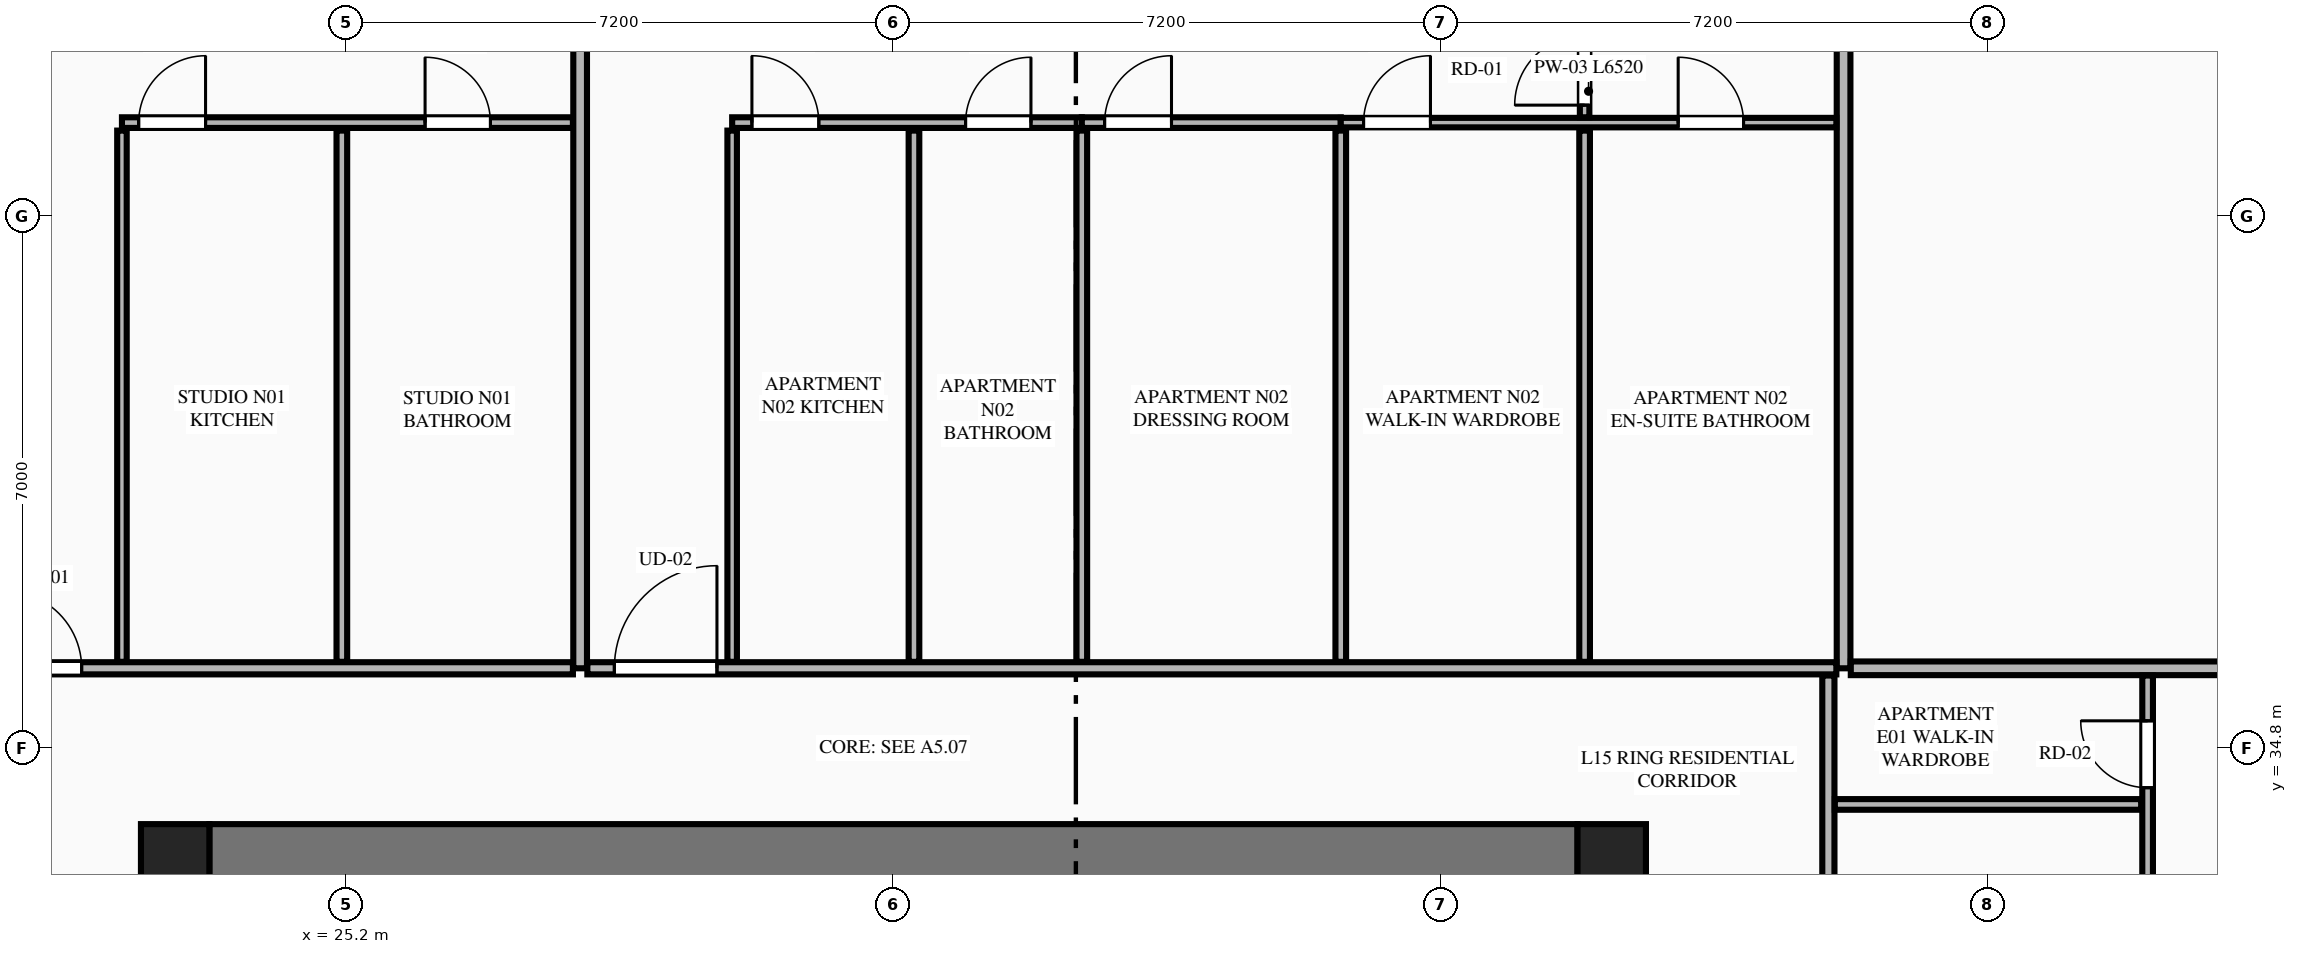
"""IFC4 building model, lengths in metres.
Left out: names, types, materials, properties, quantities, classifications, styles, units other than length and angle.
Written with IfcOpenShell. Run it as: python <this file> out.ifc"""

import sys

from ifc_helpers import new_model, si_unit, direction, frame, frame_2d, origin, origin_2d, place, context, subcontext, project, spatial, rectangle, extrude, element, fill, save


model = new_model("IFC4")
c1 = context("Model", 3, precision=1e-05, world=origin(), true_north=direction((0.0, 1.0)))
c2 = subcontext(c1, "Body", "Model", "MODEL_VIEW")
j1 = project(units=[si_unit("LENGTHUNIT", "METRE"), si_unit("PLANEANGLEUNIT", "RADIAN")], contexts=[c1])
p1 = place(None, origin())
s1 = spatial("IfcSite", under=j1, at=p1, CompositionType="ELEMENT")
p2 = place(p1, origin())
s2 = spatial("IfcBuilding", under=s1, at=p2, CompositionType="ELEMENT")
p3 = place(p2, frame((0.0, 0.0, 60.4)))
s3 = spatial("IfcBuildingStorey", under=s2, at=p3, CompositionType="ELEMENT", Elevation=60.4)
for number, where, z_axis, x_axis in (
    (1, (41.85, 33.35, 0.0), (0.0, 0.0, 1.0), (1.0, 0.0, 0.0)),
    (2, (22.95, 33.35, 0.0), (0.0, 0.0, 1.0), (1.0, 0.0, 0.0)),
):
    element("IfcColumn", number, at=place(p3, frame(where, z_axis=z_axis, x_axis=x_axis)), inside=s3, PredefinedType="COLUMN", context=c2, shape_type="SweptSolid", body=[
        extrude(rectangle(XDim=0.9, YDim=0.9, at=origin_2d()), origin(), (0.0, 0.0, 1.0), 3.55),
    ])
p4 = place(p3, frame((23.4, 33.35, 0.0), z_axis=(0.0, 0.0, 1.0), x_axis=(1.0, 0.0, 0.0)))
e3 = element("IfcWall", 3, at=p4, inside=s3, PredefinedType="SHEAR", context=c2, shape_type="SweptSolid", body=[
    extrude(rectangle(XDim=18.0, YDim=0.9, at=frame_2d((9.0, 0.0))), origin(), (0.0, 0.0, 1.0), 3.33),
])
p5 = place(p3, frame((51.583, 41.372, 0.0), z_axis=(0.0, 0.0, 1.0), x_axis=(-0.451697561555, 0.892171123095, 0.0)))
e4 = element("IfcWall", 4, at=p5, inside=s3, PredefinedType="STANDARD", context=c2, shape_type="SweptSolid", body=[
    extrude(rectangle(XDim=5.351, YDim=0.34, at=frame_2d((2.675, 0.0))), origin(), (0.0, 0.0, 1.0), 2.787),
])
p6 = place(p5, frame((2.125, 0.0, 0.75)))
e5 = element("IfcOpeningElement", 5, at=p6, cuts=e4, PredefinedType="OPENING", context=c2, shape_type="SweptSolid", body=[
    extrude(rectangle(XDim=1.1, YDim=1.887, at=frame_2d((0.55, 0.943))), frame((0.0, 0.18, 0.0), z_axis=(0.0, -1.0, 0.0), x_axis=(1.0, 0.0, 0.0)), (0.0, 0.0, 1.0), 0.36),
])
p7 = place(p3, frame((28.278, 35.85, 0.0), z_axis=(0.0, 0.0, 1.0), x_axis=(0.0, 1.0, 0.0)))
e6 = element("IfcWall", 6, at=p7, inside=s3, PredefinedType="PARTITIONING", context=c2, shape_type="SweptSolid", body=[
    extrude(rectangle(XDim=13.295, YDim=0.18, at=frame_2d((6.647, 0.0))), origin(), (0.0, 0.0, 1.0), 2.636),
])
p8 = place(p3, frame((44.9, 35.85, 0.0), z_axis=(0.0, 0.0, 1.0), x_axis=(0.0, 1.0, 0.0)))
e7 = element("IfcWall", 7, at=p8, inside=s3, PredefinedType="PARTITIONING", context=c2, shape_type="SweptSolid", body=[
    extrude(rectangle(XDim=13.295, YDim=0.18, at=frame_2d((6.647, 0.0))), origin(), (0.0, 0.0, 1.0), 3.33),
])
p9 = place(p3, frame((19.995, 35.85, 0.0), z_axis=(0.0, 0.0, 1.0), x_axis=(1.0, 0.0, 0.0)))
e8 = element("IfcWall", 8, at=p9, inside=s3, PredefinedType="PARTITIONING", context=c2, shape_type="SweptSolid", body=[
    extrude(rectangle(XDim=8.188, YDim=0.16, at=frame_2d((4.094, 0.0))), origin(), (0.0, 0.0, 1.0), 3.33),
])
p10 = place(p9, frame((0.705, 0.0, 0.0)))
e9 = element("IfcOpeningElement", 9, at=p10, cuts=e8, PredefinedType="OPENING", context=c2, shape_type="SweptSolid", body=[
    extrude(rectangle(XDim=1.02, YDim=2.25, at=frame_2d((0.51, 1.125))), frame((0.0, 0.09, 0.0), z_axis=(0.0, -1.0, 0.0), x_axis=(1.0, 0.0, 0.0)), (0.0, 0.0, 1.0), 0.18),
])
p11 = place(p3, frame((22.25, 35.935, 0.0), z_axis=(0.0, 0.0, 1.0), x_axis=(0.0, 1.0, 0.0)))
e10 = element("IfcWall", 10, at=p11, inside=s3, PredefinedType="PARTITIONING", context=c2, shape_type="SweptSolid", body=[
    extrude(rectangle(XDim=6.989, YDim=0.125, at=frame_2d((3.495, 0.0))), origin(), (0.0, 0.0, 1.0), 2.636),
])
p12 = place(p3, frame((22.25, 43.029, 0.0), z_axis=(0.0, 0.0, 1.0), x_axis=(1.0, 0.0, 0.0)))
e11 = element("IfcWall", 11, at=p12, inside=s3, PredefinedType="PLUMBINGWALL", context=c2, shape_type="SweptSolid", body=[
    extrude(rectangle(XDim=5.933, YDim=0.14, at=frame_2d((2.967, 0.0))), origin(), (0.0, 0.0, 1.0), 3.33),
])
p13 = place(p12, frame((3.988, 0.0, 0.0)))
e12 = element("IfcOpeningElement", 12, at=p13, cuts=e11, PredefinedType="OPENING", context=c2, shape_type="SweptSolid", body=[
    extrude(rectangle(XDim=0.86, YDim=2.1, at=frame_2d((0.43, 1.05))), frame((0.0, 0.08, 0.0), z_axis=(0.0, -1.0, 0.0), x_axis=(1.0, 0.0, 0.0)), (0.0, 0.0, 1.0), 0.16),
])
p14 = place(p12, frame((0.22, 0.0, 0.0)))
e13 = element("IfcOpeningElement", 13, at=p14, cuts=e11, PredefinedType="OPENING", context=c2, shape_type="SweptSolid", body=[
    extrude(rectangle(XDim=0.88, YDim=2.15, at=frame_2d((0.44, 1.075))), frame((0.0, 0.08, 0.0), z_axis=(0.0, -1.0, 0.0), x_axis=(1.0, 0.0, 0.0)), (0.0, 0.0, 1.0), 0.16),
])
p15 = place(p3, frame((25.143, 35.935, 0.0), z_axis=(0.0, 0.0, 1.0), x_axis=(0.0, 1.0, 0.0)))
e14 = element("IfcWall", 14, at=p15, inside=s3, PredefinedType="PLUMBINGWALL", context=c2, shape_type="SweptSolid", body=[
    extrude(rectangle(XDim=6.989, YDim=0.14, at=frame_2d((3.495, 0.0))), origin(), (0.0, 0.0, 1.0), 3.33),
])
p16 = place(p3, frame((28.373, 35.85, 0.0), z_axis=(0.0, 0.0, 1.0), x_axis=(1.0, 0.0, 0.0)))
e15 = element("IfcWall", 15, at=p16, inside=s3, PredefinedType="PARTITIONING", context=c2, shape_type="SweptSolid", body=[
    extrude(rectangle(XDim=16.432, YDim=0.16, at=frame_2d((8.216, 0.0))), origin(), (0.0, 0.0, 1.0), 3.33),
])
p17 = place(p16, frame((0.355, 0.0, 0.0)))
e16 = element("IfcOpeningElement", 16, at=p17, cuts=e15, PredefinedType="OPENING", context=c2, shape_type="SweptSolid", body=[
    extrude(rectangle(XDim=1.35, YDim=2.35, at=frame_2d((0.675, 1.175))), frame((0.0, 0.09, 0.0), z_axis=(0.0, -1.0, 0.0), x_axis=(1.0, 0.0, 0.0)), (0.0, 0.0, 1.0), 0.18),
])
p18 = place(p3, frame((30.278, 35.935, 0.0), z_axis=(0.0, 0.0, 1.0), x_axis=(0.0, 1.0, 0.0)))
e17 = element("IfcWall", 17, at=p18, inside=s3, PredefinedType="PARTITIONING", context=c2, shape_type="SweptSolid", body=[
    extrude(rectangle(XDim=6.989, YDim=0.125, at=frame_2d((3.495, 0.0))), origin(), (0.0, 0.0, 1.0), 3.33),
])
p19 = place(p3, frame((30.278, 43.029, 0.0), z_axis=(0.0, 0.0, 1.0), x_axis=(1.0, 0.0, 0.0)))
e18 = element("IfcWall", 18, at=p19, inside=s3, PredefinedType="PLUMBINGWALL", context=c2, shape_type="SweptSolid", body=[
    extrude(rectangle(XDim=4.6, YDim=0.14, at=frame_2d((2.3, 0.0))), origin(), (0.0, 0.0, 1.0), 3.33),
])
p20 = place(p19, frame((3.071, 0.0, 0.0)))
e19 = element("IfcOpeningElement", 19, at=p20, cuts=e18, PredefinedType="OPENING", context=c2, shape_type="SweptSolid", body=[
    extrude(rectangle(XDim=0.86, YDim=2.1, at=frame_2d((0.43, 1.05))), frame((0.0, 0.08, 0.0), z_axis=(0.0, -1.0, 0.0), x_axis=(1.0, 0.0, 0.0)), (0.0, 0.0, 1.0), 0.16),
])
p21 = place(p19, frame((0.26, 0.0, 0.0)))
e20 = element("IfcOpeningElement", 20, at=p21, cuts=e18, PredefinedType="OPENING", context=c2, shape_type="SweptSolid", body=[
    extrude(rectangle(XDim=0.88, YDim=2.15, at=frame_2d((0.44, 1.075))), frame((0.0, 0.08, 0.0), z_axis=(0.0, -1.0, 0.0), x_axis=(1.0, 0.0, 0.0)), (0.0, 0.0, 1.0), 0.16),
])
p22 = place(p3, frame((34.878, 43.029, 0.0), z_axis=(0.0, 0.0, 1.0), x_axis=(1.0, 0.0, 0.0)))
e21 = element("IfcWall", 21, at=p22, inside=s3, PredefinedType="PLUMBINGWALL", context=c2, shape_type="SweptSolid", body=[
    extrude(rectangle(XDim=3.407, YDim=0.14, at=frame_2d((1.704, 0.0))), origin(), (0.0, 0.0, 1.0), 3.33),
])
p23 = place(p22, frame((0.3, 0.0, 0.0)))
e22 = element("IfcOpeningElement", 22, at=p23, cuts=e21, PredefinedType="OPENING", context=c2, shape_type="SweptSolid", body=[
    extrude(rectangle(XDim=0.88, YDim=2.15, at=frame_2d((0.44, 1.075))), frame((0.0, 0.08, 0.0), z_axis=(0.0, -1.0, 0.0), x_axis=(1.0, 0.0, 0.0)), (0.0, 0.0, 1.0), 0.16),
])
p24 = place(p3, frame((38.285, 43.029, 0.0), z_axis=(0.0, 0.0, 1.0), x_axis=(1.0, 0.0, 0.0)))
e23 = element("IfcWall", 23, at=p24, inside=s3, PredefinedType="PARTITIONING", context=c2, shape_type="SweptSolid", body=[
    extrude(rectangle(XDim=6.52, YDim=0.125, at=frame_2d((3.26, 0.0))), origin(), (0.0, 0.0, 1.0), 3.33),
])
p25 = place(p24, frame((4.439, 0.0, 0.0)))
e24 = element("IfcOpeningElement", 24, at=p25, cuts=e23, PredefinedType="OPENING", context=c2, shape_type="SweptSolid", body=[
    extrude(rectangle(XDim=0.86, YDim=2.1, at=frame_2d((0.43, 1.05))), frame((0.0, 0.073, 0.0), z_axis=(0.0, -1.0, 0.0), x_axis=(1.0, 0.0, 0.0)), (0.0, 0.0, 1.0), 0.145),
])
p26 = place(p24, frame((0.3, 0.0, 0.0)))
e25 = element("IfcOpeningElement", 25, at=p26, cuts=e23, PredefinedType="OPENING", context=c2, shape_type="SweptSolid", body=[
    extrude(rectangle(XDim=0.88, YDim=2.15, at=frame_2d((0.44, 1.075))), frame((0.0, 0.073, 0.0), z_axis=(0.0, -1.0, 0.0), x_axis=(1.0, 0.0, 0.0)), (0.0, 0.0, 1.0), 0.145),
])
p27 = place(p3, frame((32.67, 35.935, 0.0), z_axis=(0.0, 0.0, 1.0), x_axis=(0.0, 1.0, 0.0)))
e26 = element("IfcWall", 26, at=p27, inside=s3, PredefinedType="PLUMBINGWALL", context=c2, shape_type="SweptSolid", body=[
    extrude(rectangle(XDim=6.989, YDim=0.14, at=frame_2d((3.495, 0.0))), origin(), (0.0, 0.0, 1.0), 3.33),
])
p28 = place(p3, frame((41.493, 43.099, 0.0), z_axis=(0.0, 0.0, 1.0), x_axis=(0.0, 1.0, 0.0)))
e27 = element("IfcWall", 27, at=p28, inside=s3, PredefinedType="PARTITIONING", context=c2, shape_type="SweptSolid", body=[
    extrude(rectangle(XDim=1.33, YDim=0.125, at=frame_2d((0.665, 0.0))), origin(), (0.0, 0.0, 1.0), 3.33),
])
p29 = place(p28, frame((0.16, 0.0, 0.0)))
e28 = element("IfcOpeningElement", 28, at=p29, cuts=e27, PredefinedType="OPENING", context=c2, shape_type="SweptSolid", body=[
    extrude(rectangle(XDim=0.92, YDim=2.15, at=frame_2d((0.46, 1.075))), frame((0.0, 0.073, 0.0), z_axis=(0.0, -1.0, 0.0), x_axis=(1.0, 0.0, 0.0)), (0.0, 0.0, 1.0), 0.145),
])
for number, where, z_axis, x_axis in (
    (29, (34.878, 35.935, 0.0), (0.0, 0.0, 1.0), (0.0, 1.0, 0.0)),
    (30, (38.285, 35.935, 0.0), (0.0, 0.0, 1.0), (0.0, 1.0, 0.0)),
    (31, (41.493, 35.935, 0.0), (0.0, 0.0, 1.0), (0.0, 1.0, 0.0)),
):
    element("IfcWall", number, at=place(p3, frame(where, z_axis=z_axis, x_axis=x_axis)), inside=s3, PredefinedType="PLUMBINGWALL", context=c2, shape_type="SweptSolid", body=[
        extrude(rectangle(XDim=6.989, YDim=0.14, at=frame_2d((3.495, 0.0))), origin(), (0.0, 0.0, 1.0), 3.33),
    ])
p30 = place(p3, frame((44.995, 35.85, 0.0), z_axis=(0.0, 0.0, 1.0), x_axis=(1.0, 0.0, 0.0)))
e32 = element("IfcWall", 32, at=p30, inside=s3, PredefinedType="PARTITIONING", context=c2, shape_type="SweptSolid", body=[
    extrude(rectangle(XDim=9.14, YDim=0.18, at=frame_2d((4.57, 0.0))), origin(), (0.0, 0.0, 1.0), 3.33),
])
p31 = place(p3, frame((44.7, 16.045, 0.0), z_axis=(0.0, 0.0, 1.0), x_axis=(0.0, 1.0, 0.0)))
e33 = element("IfcWall", 33, at=p31, inside=s3, PredefinedType="PARTITIONING", context=c2, shape_type="SweptSolid", body=[
    extrude(rectangle(XDim=19.71, YDim=0.16, at=frame_2d((9.855, 0.0))), origin(), (0.0, 0.0, 1.0), 3.33),
])
p32 = place(p31, frame((0.45, 0.0, 0.0)))
e34 = element("IfcOpeningElement", 34, at=p32, cuts=e33, PredefinedType="OPENING", context=c2, shape_type="SweptSolid", body=[
    extrude(rectangle(XDim=1.02, YDim=2.25, at=frame_2d((0.51, 1.125))), frame((0.0, 0.09, 0.0), z_axis=(0.0, -1.0, 0.0), x_axis=(1.0, 0.0, 0.0)), (0.0, 0.0, 1.0), 0.18),
])
p33 = place(p3, frame((48.9, 30.626, 0.0), z_axis=(0.0, 0.0, 1.0), x_axis=(0.0, 1.0, 0.0)))
e35 = element("IfcWall", 35, at=p33, inside=s3, PredefinedType="PLUMBINGWALL", context=c2, shape_type="SweptSolid", body=[
    extrude(rectangle(XDim=5.129, YDim=0.14, at=frame_2d((2.564, 0.0))), origin(), (0.0, 0.0, 1.0), 3.33),
])
p34 = place(p33, frame((0.22, 0.0, 0.0)))
e36 = element("IfcOpeningElement", 36, at=p34, cuts=e35, PredefinedType="OPENING", context=c2, shape_type="SweptSolid", body=[
    extrude(rectangle(XDim=0.86, YDim=2.1, at=frame_2d((0.43, 1.05))), frame((0.0, 0.08, 0.0), z_axis=(0.0, -1.0, 0.0), x_axis=(1.0, 0.0, 0.0)), (0.0, 0.0, 1.0), 0.16),
])
p35 = place(p33, frame((3.653, 0.0, 0.0)))
e37 = element("IfcOpeningElement", 37, at=p35, cuts=e35, PredefinedType="OPENING", context=c2, shape_type="SweptSolid", body=[
    extrude(rectangle(XDim=0.88, YDim=2.15, at=frame_2d((0.44, 1.075))), frame((0.0, 0.08, 0.0), z_axis=(0.0, -1.0, 0.0), x_axis=(1.0, 0.0, 0.0)), (0.0, 0.0, 1.0), 0.16),
])
p36 = place(p3, frame((44.785, 34.059, 0.0), z_axis=(0.0, 0.0, 1.0), x_axis=(1.0, 0.0, 0.0)))
e38 = element("IfcWall", 38, at=p36, inside=s3, PredefinedType="PLUMBINGWALL", context=c2, shape_type="SweptSolid", body=[
    extrude(rectangle(XDim=4.03, YDim=0.14, at=frame_2d((2.015, 0.0))), origin(), (0.0, 0.0, 1.0), 2.636),
])
p37 = place(p13, origin())
e39 = element("IfcDoor", 39, at=p37, inside=s3, OperationType="SINGLE_SWING_LEFT", PredefinedType="DOOR", context=c2, shape_type="SweptSolid", body=[
    extrude(rectangle(XDim=0.86, YDim=2.1, at=frame_2d((0.43, 1.05))), frame((0.0, 0.025, 0.0), z_axis=(0.0, -1.0, 0.0), x_axis=(1.0, 0.0, 0.0)), (0.0, 0.0, 1.0), 0.05),
])
fill(e12, e39)
p38 = place(p10, origin())
e40 = element("IfcDoor", 40, at=p38, inside=s3, OperationType="SINGLE_SWING_LEFT", PredefinedType="DOOR", context=c2, shape_type="SweptSolid", body=[
    extrude(rectangle(XDim=1.02, YDim=2.25, at=frame_2d((0.51, 1.125))), frame((0.0, 0.025, 0.0), z_axis=(0.0, -1.0, 0.0), x_axis=(1.0, 0.0, 0.0)), (0.0, 0.0, 1.0), 0.05),
])
fill(e9, e40)
p39 = place(p14, origin())
e41 = element("IfcDoor", 41, at=p39, inside=s3, OperationType="SINGLE_SWING_RIGHT", PredefinedType="DOOR", context=c2, shape_type="SweptSolid", body=[
    extrude(rectangle(XDim=0.88, YDim=2.15, at=frame_2d((0.44, 1.075))), frame((0.0, 0.025, 0.0), z_axis=(0.0, -1.0, 0.0), x_axis=(1.0, 0.0, 0.0)), (0.0, 0.0, 1.0), 0.05),
])
fill(e13, e41)
p40 = place(p20, origin())
e42 = element("IfcDoor", 42, at=p40, inside=s3, OperationType="SINGLE_SWING_RIGHT", PredefinedType="DOOR", context=c2, shape_type="SweptSolid", body=[
    extrude(rectangle(XDim=0.86, YDim=2.1, at=frame_2d((0.43, 1.05))), frame((0.0, 0.025, 0.0), z_axis=(0.0, -1.0, 0.0), x_axis=(1.0, 0.0, 0.0)), (0.0, 0.0, 1.0), 0.05),
])
fill(e19, e42)
p41 = place(p25, origin())
e43 = element("IfcDoor", 43, at=p41, inside=s3, OperationType="SINGLE_SWING_LEFT", PredefinedType="DOOR", context=c2, shape_type="SweptSolid", body=[
    extrude(rectangle(XDim=0.86, YDim=2.1, at=frame_2d((0.43, 1.05))), frame((0.0, 0.025, 0.0), z_axis=(0.0, -1.0, 0.0), x_axis=(1.0, 0.0, 0.0)), (0.0, 0.0, 1.0), 0.05),
])
fill(e24, e43)
p42 = place(p17, origin())
e44 = element("IfcDoor", 44, at=p42, inside=s3, OperationType="SINGLE_SWING_RIGHT", PredefinedType="DOOR", context=c2, shape_type="SweptSolid", body=[
    extrude(rectangle(XDim=1.35, YDim=2.35, at=frame_2d((0.675, 1.175))), frame((0.0, 0.025, 0.0), z_axis=(0.0, -1.0, 0.0), x_axis=(1.0, 0.0, 0.0)), (0.0, 0.0, 1.0), 0.05),
])
fill(e16, e44)
p43 = place(p21, origin())
e45 = element("IfcDoor", 45, at=p43, inside=s3, OperationType="SINGLE_SWING_LEFT", PredefinedType="DOOR", context=c2, shape_type="SweptSolid", body=[
    extrude(rectangle(XDim=0.88, YDim=2.15, at=frame_2d((0.44, 1.075))), frame((0.0, 0.025, 0.0), z_axis=(0.0, -1.0, 0.0), x_axis=(1.0, 0.0, 0.0)), (0.0, 0.0, 1.0), 0.05),
])
fill(e20, e45)
p44 = place(p23, origin())
e46 = element("IfcDoor", 46, at=p44, inside=s3, OperationType="SINGLE_SWING_RIGHT", PredefinedType="DOOR", context=c2, shape_type="SweptSolid", body=[
    extrude(rectangle(XDim=0.88, YDim=2.15, at=frame_2d((0.44, 1.075))), frame((0.0, 0.025, 0.0), z_axis=(0.0, -1.0, 0.0), x_axis=(1.0, 0.0, 0.0)), (0.0, 0.0, 1.0), 0.05),
])
fill(e22, e46)
p45 = place(p29, origin())
e47 = element("IfcDoor", 47, at=p45, inside=s3, OperationType="SINGLE_SWING_LEFT", PredefinedType="DOOR", context=c2, shape_type="SweptSolid", body=[
    extrude(rectangle(XDim=0.92, YDim=2.15, at=frame_2d((0.46, 1.075))), frame((0.0, 0.025, 0.0), z_axis=(0.0, -1.0, 0.0), x_axis=(1.0, 0.0, 0.0)), (0.0, 0.0, 1.0), 0.05),
])
fill(e28, e47)
p46 = place(p26, origin())
e48 = element("IfcDoor", 48, at=p46, inside=s3, OperationType="SINGLE_SWING_RIGHT", PredefinedType="DOOR", context=c2, shape_type="SweptSolid", body=[
    extrude(rectangle(XDim=0.88, YDim=2.15, at=frame_2d((0.44, 1.075))), frame((0.0, 0.025, 0.0), z_axis=(0.0, -1.0, 0.0), x_axis=(1.0, 0.0, 0.0)), (0.0, 0.0, 1.0), 0.05),
])
fill(e25, e48)
p47 = place(p35, origin())
e49 = element("IfcDoor", 49, at=p47, inside=s3, OperationType="SINGLE_SWING_RIGHT", PredefinedType="DOOR", context=c2, shape_type="SweptSolid", body=[
    extrude(rectangle(XDim=0.88, YDim=2.15, at=frame_2d((0.44, 1.075))), frame((0.0, 0.025, 0.0), z_axis=(0.0, -1.0, 0.0), x_axis=(1.0, 0.0, 0.0)), (0.0, 0.0, 1.0), 0.05),
])
fill(e37, e49)
save(model, sys.argv[1])
